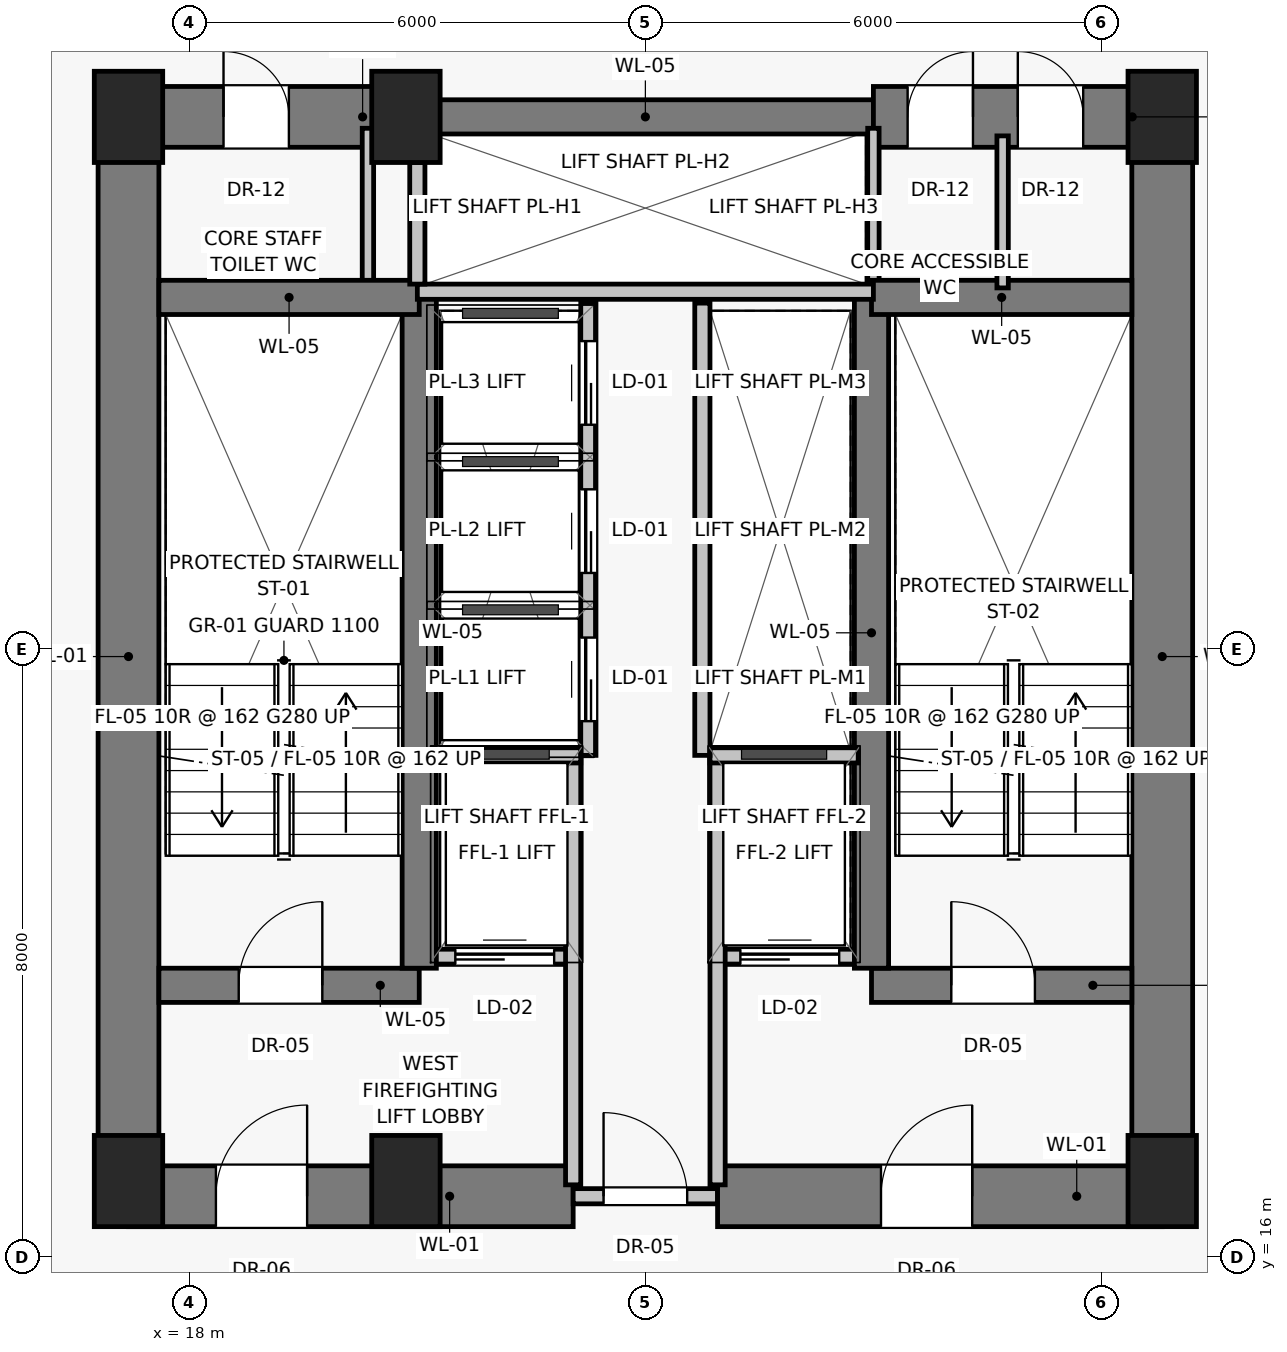
"""IFC4 building model, lengths in metres.
Left out: names, types, materials, properties, quantities, classifications, styles, units other than length and angle.
Written with IfcOpenShell. Run it as: python <this file> out.ifc"""

import sys

from ifc_helpers import new_model, si_unit, direction, frame, frame_2d, origin, origin_2d, place, context, subcontext, project, spatial, rectangle, extrude, source, transform, mapped, element, fill, save


model = new_model("IFC4")
c1 = context("Model", 3, precision=1e-05, world=origin(), true_north=direction((0.0, 1.0)))
c2 = subcontext(c1, "Body", "Model", "MODEL_VIEW")
j1 = project(units=[si_unit("LENGTHUNIT", "METRE"), si_unit("PLANEANGLEUNIT", "RADIAN")], contexts=[c1])
p1 = place(None, origin())
s1 = spatial("IfcSite", under=j1, at=p1, CompositionType="ELEMENT")
p2 = place(p1, origin())
s2 = spatial("IfcBuilding", under=s1, at=p2, CompositionType="ELEMENT")
p3 = place(p2, frame((0.0, 0.0, 67.35)))
s3 = spatial("IfcBuildingStorey", under=s2, at=p3, CompositionType="ELEMENT", Elevation=67.35)
for number, where, z_axis, x_axis in (
    (1, (17.2, 17.0, 0.0), (0.0, 0.0, 1.0), (1.0, 0.0, 0.0)),
    (2, (20.85, 17.0, 0.0), (0.0, 0.0, 1.0), (1.0, 0.0, 0.0)),
    (3, (30.8, 17.0, 0.0), (0.0, 0.0, 1.0), (1.0, 0.0, 0.0)),
    (4, (17.2, 31.0, 0.0), (0.0, 0.0, 1.0), (1.0, 0.0, 0.0)),
    (5, (20.85, 31.0, 0.0), (0.0, 0.0, 1.0), (1.0, 0.0, 0.0)),
    (6, (30.8, 31.0, 0.0), (0.0, 0.0, 1.0), (1.0, 0.0, 0.0)),
):
    element("IfcColumn", number, at=place(p3, frame(where, z_axis=z_axis, x_axis=x_axis)), inside=s3, PredefinedType="PILASTER", context=c2, shape_type="SweptSolid", body=[
        extrude(rectangle(XDim=0.9, YDim=1.2, at=origin_2d()), origin(), (0.0, 0.0, 1.0), 3.25),
    ])
for number, where, z_axis, x_axis in (
    (7, (17.2, 16.8, 0.0), (0.0, 0.0, 1.0), (0.0, 1.0, 0.0)),
    (8, (30.8, 16.8, 0.0), (0.0, 0.0, 1.0), (0.0, 1.0, 0.0)),
):
    element("IfcWall", number, at=place(p3, frame(where, z_axis=z_axis, x_axis=x_axis)), inside=s3, PredefinedType="SHEAR", context=c2, shape_type="SweptSolid", body=[
        extrude(rectangle(XDim=14.2, YDim=0.8, at=frame_2d((7.1, 0.0))), origin(), (0.0, 0.0, 1.0), 3.0),
    ])
p4 = place(p3, frame((17.2, 16.8, 0.0), z_axis=(0.0, 0.0, 1.0), x_axis=(1.0, 0.0, 0.0)))
e9 = element("IfcWall", 9, at=p4, inside=s3, PredefinedType="SHEAR", context=c2, shape_type="SweptSolid", body=[
    extrude(rectangle(XDim=5.85, YDim=0.8, at=frame_2d((2.925, 0.0))), origin(), (0.0, 0.0, 1.0), 3.0),
])
p5 = place(p4, frame((1.15, 0.0, 0.0)))
e10 = element("IfcOpeningElement", 10, at=p5, cuts=e9, PredefinedType="OPENING", context=c2, shape_type="SweptSolid", body=[
    extrude(rectangle(XDim=1.2, YDim=2.03, at=frame_2d((0.6, 1.015))), frame((0.0, 0.41, 0.0), z_axis=(0.0, -1.0, 0.0), x_axis=(1.0, 0.0, 0.0)), (0.0, 0.0, 1.0), 0.82),
])
p6 = place(p3, frame((23.05, 16.8, 0.0), z_axis=(0.0, 0.0, 1.0), x_axis=(1.0, 0.0, 0.0)))
e11 = element("IfcWall", 11, at=p6, inside=s3, PredefinedType="SOLIDWALL", context=c2, shape_type="SweptSolid", body=[
    extrude(rectangle(XDim=1.9, YDim=0.2, at=frame_2d((0.95, 0.0))), origin(), (0.0, 0.0, 1.0), 2.15),
])
p7 = place(p6, frame((0.4, 0.0, 0.0)))
e12 = element("IfcOpeningElement", 12, at=p7, cuts=e11, PredefinedType="OPENING", context=c2, shape_type="SweptSolid", body=[
    extrude(rectangle(XDim=1.1, YDim=2.03, at=frame_2d((0.55, 1.015))), frame((0.0, 0.11, 0.0), z_axis=(0.0, -1.0, 0.0), x_axis=(1.0, 0.0, 0.0)), (0.0, 0.0, 1.0), 0.22),
])
p8 = place(p3, frame((24.95, 16.8, 0.0), z_axis=(0.0, 0.0, 1.0), x_axis=(1.0, 0.0, 0.0)))
e13 = element("IfcWall", 13, at=p8, inside=s3, PredefinedType="SHEAR", context=c2, shape_type="SweptSolid", body=[
    extrude(rectangle(XDim=5.85, YDim=0.8, at=frame_2d((2.925, 0.0))), origin(), (0.0, 0.0, 1.0), 3.0),
])
p9 = place(p8, frame((2.15, 0.0, 0.0)))
e14 = element("IfcOpeningElement", 14, at=p9, cuts=e13, PredefinedType="OPENING", context=c2, shape_type="SweptSolid", body=[
    extrude(rectangle(XDim=1.2, YDim=2.03, at=frame_2d((0.6, 1.015))), frame((0.0, 0.41, 0.0), z_axis=(0.0, -1.0, 0.0), x_axis=(1.0, 0.0, 0.0)), (0.0, 0.0, 1.0), 0.82),
])
p10 = place(p3, frame((17.2, 31.0, 0.0), z_axis=(0.0, 0.0, 1.0), x_axis=(1.0, 0.0, 0.0)))
e15 = element("IfcWall", 15, at=p10, inside=s3, PredefinedType="SHEAR", context=c2, shape_type="SweptSolid", body=[
    extrude(rectangle(XDim=3.8, YDim=0.8, at=frame_2d((1.9, 0.0))), origin(), (0.0, 0.0, 1.0), 3.0),
])
p11 = place(p10, frame((1.25, 0.0, 0.0)))
e16 = element("IfcOpeningElement", 16, at=p11, cuts=e15, PredefinedType="OPENING", context=c2, shape_type="SweptSolid", body=[
    extrude(rectangle(XDim=0.86, YDim=2.01, at=frame_2d((0.43, 1.005))), frame((0.0, 0.41, 0.0), z_axis=(0.0, -1.0, 0.0), x_axis=(1.0, 0.0, 0.0)), (0.0, 0.0, 1.0), 0.82),
])
p12 = place(p3, frame((21.0, 31.0, 0.0), z_axis=(0.0, 0.0, 1.0), x_axis=(1.0, 0.0, 0.0)))
e17 = element("IfcWall", 17, at=p12, inside=s3, PredefinedType="SHEAR", context=c2, shape_type="SweptSolid", body=[
    extrude(rectangle(XDim=6.0, YDim=0.45, at=frame_2d((3.0, 0.0))), origin(), (0.0, 0.0, 1.0), 3.0),
])
p13 = place(p3, frame((27.0, 31.0, 0.0), z_axis=(0.0, 0.0, 1.0), x_axis=(1.0, 0.0, 0.0)))
e18 = element("IfcWall", 18, at=p13, inside=s3, PredefinedType="SHEAR", context=c2, shape_type="SweptSolid", body=[
    extrude(rectangle(XDim=3.8, YDim=0.8, at=frame_2d((1.9, 0.0))), origin(), (0.0, 0.0, 1.0), 3.0),
])
p14 = place(p13, frame((0.45, 0.0, 0.0)))
e19 = element("IfcOpeningElement", 19, at=p14, cuts=e18, PredefinedType="OPENING", context=c2, shape_type="SweptSolid", body=[
    extrude(rectangle(XDim=0.86, YDim=2.01, at=frame_2d((0.43, 1.005))), frame((0.0, 0.41, 0.0), z_axis=(0.0, -1.0, 0.0), x_axis=(1.0, 0.0, 0.0)), (0.0, 0.0, 1.0), 0.82),
])
p15 = place(p13, frame((1.9, 0.0, 0.0)))
e20 = element("IfcOpeningElement", 20, at=p15, cuts=e18, PredefinedType="OPENING", context=c2, shape_type="SweptSolid", body=[
    extrude(rectangle(XDim=0.86, YDim=2.01, at=frame_2d((0.43, 1.005))), frame((0.0, 0.41, 0.0), z_axis=(0.0, -1.0, 0.0), x_axis=(1.0, 0.0, 0.0)), (0.0, 0.0, 1.0), 0.82),
])
for number, where, z_axis, x_axis in (
    (21, (20.35, 28.65, 0.0), (0.0, 0.0, 1.0), (0.0, 1.0, 0.0)),
    (22, (27.0, 28.65, 0.0), (0.0, 0.0, 1.0), (0.0, 1.0, 0.0)),
):
    element("IfcWall", number, at=place(p3, frame(where, z_axis=z_axis, x_axis=x_axis)), inside=s3, PredefinedType="PARTITIONING", context=c2, shape_type="SweptSolid", body=[
        extrude(rectangle(XDim=2.2, YDim=0.15, at=frame_2d((1.1, 0.0))), origin(), (0.0, 0.0, 1.0), 3.0),
    ])
p16 = place(p3, frame((17.6, 19.575, 0.0), z_axis=(0.0, 0.0, 1.0), x_axis=(1.0, 0.0, 0.0)))
e23 = element("IfcWall", 23, at=p16, inside=s3, PredefinedType="SHEAR", context=c2, shape_type="SweptSolid", body=[
    extrude(rectangle(XDim=3.425, YDim=0.45, at=frame_2d((1.712, 0.0))), origin(), (0.0, 0.0, 1.0), 3.0),
])
p17 = place(p16, frame((1.05, 0.0, 0.0)))
e24 = element("IfcOpeningElement", 24, at=p17, cuts=e23, PredefinedType="OPENING", context=c2, shape_type="SweptSolid", body=[
    extrude(rectangle(XDim=1.1, YDim=2.03, at=frame_2d((0.55, 1.015))), frame((0.0, 0.235, 0.0), z_axis=(0.0, -1.0, 0.0), x_axis=(1.0, 0.0, 0.0)), (0.0, 0.0, 1.0), 0.47),
])
p18 = place(p3, frame((21.2, 19.95, 0.0), z_axis=(0.0, 0.0, 1.0), x_axis=(1.0, 0.0, 0.0)))
e25 = element("IfcWall", 25, at=p18, inside=s3, PredefinedType="SOLIDWALL", context=c2, shape_type="SweptSolid", body=[
    extrude(rectangle(XDim=1.85, YDim=0.2, at=frame_2d((0.925, 0.0))), origin(), (0.0, 0.0, 1.0), 3.0),
])
p19 = place(p18, frame((0.3, 0.0, 0.0)))
e26 = element("IfcOpeningElement", 26, at=p19, cuts=e25, PredefinedType="OPENING", context=c2, shape_type="SweptSolid", body=[
    extrude(rectangle(XDim=1.3, YDim=2.25, at=frame_2d((0.65, 1.125))), frame((0.0, 0.11, 0.0), z_axis=(0.0, -1.0, 0.0), x_axis=(1.0, 0.0, 0.0)), (0.0, 0.0, 1.0), 0.22),
])
p20 = place(p3, frame((24.95, 19.95, 0.0), z_axis=(0.0, 0.0, 1.0), x_axis=(1.0, 0.0, 0.0)))
e27 = element("IfcWall", 27, at=p20, inside=s3, PredefinedType="SOLIDWALL", context=c2, shape_type="SweptSolid", body=[
    extrude(rectangle(XDim=1.85, YDim=0.2, at=frame_2d((0.925, 0.0))), origin(), (0.0, 0.0, 1.0), 3.0),
])
p21 = place(p20, frame((0.3, 0.0, 0.0)))
e28 = element("IfcOpeningElement", 28, at=p21, cuts=e27, PredefinedType="OPENING", context=c2, shape_type="SweptSolid", body=[
    extrude(rectangle(XDim=1.3, YDim=2.25, at=frame_2d((0.65, 1.125))), frame((0.0, 0.11, 0.0), z_axis=(0.0, -1.0, 0.0), x_axis=(1.0, 0.0, 0.0)), (0.0, 0.0, 1.0), 0.22),
])
p22 = place(p3, frame((26.975, 19.575, 0.0), z_axis=(0.0, 0.0, 1.0), x_axis=(1.0, 0.0, 0.0)))
e29 = element("IfcWall", 29, at=p22, inside=s3, PredefinedType="SHEAR", context=c2, shape_type="SweptSolid", body=[
    extrude(rectangle(XDim=3.425, YDim=0.45, at=frame_2d((1.712, 0.0))), origin(), (0.0, 0.0, 1.0), 3.0),
])
p23 = place(p22, frame((1.05, 0.0, 0.0)))
e30 = element("IfcOpeningElement", 30, at=p23, cuts=e29, PredefinedType="OPENING", context=c2, shape_type="SweptSolid", body=[
    extrude(rectangle(XDim=1.1, YDim=2.03, at=frame_2d((0.55, 1.015))), frame((0.0, 0.235, 0.0), z_axis=(0.0, -1.0, 0.0), x_axis=(1.0, 0.0, 0.0)), (0.0, 0.0, 1.0), 0.47),
])
for number, where, z_axis, x_axis in (
    (31, (21.025, 19.8, 0.0), (0.0, 0.0, 1.0), (0.0, 1.0, 0.0)),
    (32, (26.975, 19.8, 0.0), (0.0, 0.0, 1.0), (0.0, 1.0, 0.0)),
):
    element("IfcWall", number, at=place(p3, frame(where, z_axis=z_axis, x_axis=x_axis)), inside=s3, PredefinedType="SHEAR", context=c2, shape_type="SweptSolid", body=[
        extrude(rectangle(XDim=8.825, YDim=0.45, at=frame_2d((4.413, 0.0))), origin(), (0.0, 0.0, 1.0), 3.0),
    ])
for number, where, z_axis, x_axis in (
    (33, (17.6, 28.625, 0.0), (0.0, 0.0, 1.0), (1.0, 0.0, 0.0)),
    (34, (26.975, 28.625, 0.0), (0.0, 0.0, 1.0), (1.0, 0.0, 0.0)),
):
    element("IfcWall", number, at=place(p3, frame(where, z_axis=z_axis, x_axis=x_axis)), inside=s3, PredefinedType="SHEAR", context=c2, shape_type="SweptSolid", body=[
        extrude(rectangle(XDim=3.425, YDim=0.45, at=frame_2d((1.712, 0.0))), origin(), (0.0, 0.0, 1.0), 3.0),
    ])
for number, where, z_axis, x_axis in (
    (35, (23.05, 16.95, 0.0), (0.0, 0.0, 1.0), (0.0, 1.0, 0.0)),
    (36, (24.95, 16.95, 0.0), (0.0, 0.0, 1.0), (0.0, 1.0, 0.0)),
):
    element("IfcWall", number, at=place(p3, frame(where, z_axis=z_axis, x_axis=x_axis)), inside=s3, PredefinedType="SOLIDWALL", context=c2, shape_type="SweptSolid", body=[
        extrude(rectangle(XDim=5.6, YDim=0.2, at=frame_2d((2.8, 0.0))), origin(), (0.0, 0.0, 1.0), 3.0),
    ])
for number, where, z_axis, x_axis in (
    (37, (21.2, 22.6, 0.0), (0.0, 0.0, 1.0), (1.0, 0.0, 0.0)),
    (38, (24.85, 22.6, 0.0), (0.0, 0.0, 1.0), (1.0, 0.0, 0.0)),
):
    element("IfcWall", number, at=place(p3, frame(where, z_axis=z_axis, x_axis=x_axis)), inside=s3, PredefinedType="SOLIDWALL", context=c2, shape_type="SweptSolid", body=[
        extrude(rectangle(XDim=1.95, YDim=0.2, at=frame_2d((0.975, 0.0))), origin(), (0.0, 0.0, 1.0), 3.0),
    ])
p24 = place(p3, frame((21.0, 28.7, 0.0), z_axis=(0.0, 0.0, 1.0), x_axis=(1.0, 0.0, 0.0)))
e39 = element("IfcWall", 39, at=p24, inside=s3, PredefinedType="SOLIDWALL", context=c2, shape_type="SweptSolid", body=[
    extrude(rectangle(XDim=6.0, YDim=0.2, at=frame_2d((3.0, 0.0))), origin(), (0.0, 0.0, 1.0), 3.0),
])
p25 = place(p3, frame((21.0, 28.8, 0.0), z_axis=(0.0, 0.0, 1.0), x_axis=(0.0, 1.0, 0.0)))
e40 = element("IfcWall", 40, at=p25, inside=s3, PredefinedType="SOLIDWALL", context=c2, shape_type="SweptSolid", body=[
    extrude(rectangle(XDim=1.6, YDim=0.2, at=frame_2d((0.8, 0.0))), origin(), (0.0, 0.0, 1.0), 3.0),
])
p26 = place(p3, frame((23.25, 22.6, 0.0), z_axis=(0.0, 0.0, 1.0), x_axis=(0.0, 1.0, 0.0)))
e41 = element("IfcWall", 41, at=p26, inside=s3, PredefinedType="SOLIDWALL", context=c2, shape_type="SweptSolid", body=[
    extrude(rectangle(XDim=5.95, YDim=0.2, at=frame_2d((2.975, 0.0))), origin(), (0.0, 0.0, 1.0), 3.0),
])
p27 = place(p26, frame((0.45, 0.0, 0.0)))
e42 = element("IfcOpeningElement", 42, at=p27, cuts=e41, PredefinedType="OPENING", context=c2, shape_type="SweptSolid", body=[
    extrude(rectangle(XDim=1.1, YDim=2.08, at=frame_2d((0.55, 1.04))), frame((0.0, 0.11, 0.0), z_axis=(0.0, -1.0, 0.0), x_axis=(1.0, 0.0, 0.0)), (0.0, 0.0, 1.0), 0.22),
])
p28 = place(p26, frame((2.4, 0.0, 0.0)))
e43 = element("IfcOpeningElement", 43, at=p28, cuts=e41, PredefinedType="OPENING", context=c2, shape_type="SweptSolid", body=[
    extrude(rectangle(XDim=1.1, YDim=2.08, at=frame_2d((0.55, 1.04))), frame((0.0, 0.11, 0.0), z_axis=(0.0, -1.0, 0.0), x_axis=(1.0, 0.0, 0.0)), (0.0, 0.0, 1.0), 0.22),
])
p29 = place(p26, frame((4.35, 0.0, 0.0)))
e44 = element("IfcOpeningElement", 44, at=p29, cuts=e41, PredefinedType="OPENING", context=c2, shape_type="SweptSolid", body=[
    extrude(rectangle(XDim=1.1, YDim=2.08, at=frame_2d((0.55, 1.04))), frame((0.0, 0.11, 0.0), z_axis=(0.0, -1.0, 0.0), x_axis=(1.0, 0.0, 0.0)), (0.0, 0.0, 1.0), 0.22),
])
p30 = place(p3, frame((24.75, 22.6, 0.0), z_axis=(0.0, 0.0, 1.0), x_axis=(0.0, 1.0, 0.0)))
e45 = element("IfcWall", 45, at=p30, inside=s3, PredefinedType="SOLIDWALL", context=c2, shape_type="SweptSolid", body=[
    extrude(rectangle(XDim=5.95, YDim=0.2, at=frame_2d((2.975, 0.0))), origin(), (0.0, 0.0, 1.0), 3.0),
])
p31 = place(p3, frame((28.7, 28.75, 0.0), z_axis=(0.0, 0.0, 1.0), x_axis=(0.0, 1.0, 0.0)))
e46 = element("IfcWall", 46, at=p31, inside=s3, PredefinedType="PARTITIONING", context=c2, shape_type="SweptSolid", body=[
    extrude(rectangle(XDim=2.0, YDim=0.15, at=frame_2d((1.0, 0.0))), origin(), (0.0, 0.0, 1.0), 3.0),
])
m1 = source(origin(), c2, "Body", "SweptSolid", [
    extrude(rectangle(XDim=1.2, YDim=2.03, at=frame_2d((0.6, 1.015))), frame((0.0, 0.025, 0.0), z_axis=(0.0, -1.0, 0.0), x_axis=(1.0, 0.0, 0.0)), (0.0, 0.0, 1.0), 0.05),
])
p32 = place(p5, origin())
e47 = element("IfcDoor", 47, at=p32, inside=s3, OperationType="SINGLE_SWING_RIGHT", PredefinedType="DOOR", context=c2, shape_type="MappedRepresentation", body=[
    mapped(m1, transform((0.0, 0.0, 0.0), scale=1.0)),
])
fill(e10, e47)
m2 = source(origin(), c2, "Body", "SweptSolid", [
    extrude(rectangle(XDim=1.1, YDim=2.03, at=frame_2d((0.55, 1.015))), frame((0.0, 0.025, 0.0), z_axis=(0.0, -1.0, 0.0), x_axis=(1.0, 0.0, 0.0)), (0.0, 0.0, 1.0), 0.05),
])
p33 = place(p7, origin())
e48 = element("IfcDoor", 48, at=p33, inside=s3, OperationType="SINGLE_SWING_LEFT", PredefinedType="DOOR", context=c2, shape_type="MappedRepresentation", body=[
    mapped(m2, transform((0.0, 0.0, 0.0), scale=1.0)),
])
fill(e12, e48)
p34 = place(p9, origin())
e49 = element("IfcDoor", 49, at=p34, inside=s3, OperationType="SINGLE_SWING_RIGHT", PredefinedType="DOOR", context=c2, shape_type="MappedRepresentation", body=[
    mapped(m1, transform((0.0, 0.0, 0.0), scale=1.0)),
])
fill(e14, e49)
m3 = source(origin(), c2, "Body", "SweptSolid", [
    extrude(rectangle(XDim=0.86, YDim=2.01, at=frame_2d((0.43, 1.005))), frame((0.0, 0.025, 0.0), z_axis=(0.0, -1.0, 0.0), x_axis=(1.0, 0.0, 0.0)), (0.0, 0.0, 1.0), 0.05),
])
p35 = place(p11, origin())
e50 = element("IfcDoor", 50, at=p35, inside=s3, OperationType="SINGLE_SWING_LEFT", PredefinedType="DOOR", context=c2, shape_type="MappedRepresentation", body=[
    mapped(m3, transform((0.0, 0.0, 0.0), scale=1.0)),
])
fill(e16, e50)
p36 = place(p14, origin())
e51 = element("IfcDoor", 51, at=p36, inside=s3, OperationType="SINGLE_SWING_RIGHT", PredefinedType="DOOR", context=c2, shape_type="MappedRepresentation", body=[
    mapped(m3, transform((0.0, 0.0, 0.0), scale=1.0)),
])
fill(e19, e51)
p37 = place(p15, origin())
e52 = element("IfcDoor", 52, at=p37, inside=s3, OperationType="SINGLE_SWING_LEFT", PredefinedType="DOOR", context=c2, shape_type="MappedRepresentation", body=[
    mapped(m3, transform((0.0, 0.0, 0.0), scale=1.0)),
])
fill(e20, e52)
p38 = place(p17, origin())
e53 = element("IfcDoor", 53, at=p38, inside=s3, OperationType="SINGLE_SWING_RIGHT", PredefinedType="DOOR", context=c2, shape_type="MappedRepresentation", body=[
    mapped(m2, transform((0.0, 0.0, 0.0), scale=1.0)),
])
fill(e24, e53)
m4 = source(origin(), c2, "Body", "SweptSolid", [
    extrude(rectangle(XDim=1.3, YDim=2.25, at=frame_2d((0.65, 1.125))), frame((0.0, 0.025, 0.0), z_axis=(0.0, -1.0, 0.0), x_axis=(1.0, 0.0, 0.0)), (0.0, 0.0, 1.0), 0.05),
])
p39 = place(p19, origin())
e54 = element("IfcDoor", 54, at=p39, inside=s3, OperationType="SLIDING_TO_LEFT", PredefinedType="DOOR", context=c2, shape_type="MappedRepresentation", body=[
    mapped(m4, transform((0.0, 0.0, 0.0), scale=1.0)),
])
fill(e26, e54)
p40 = place(p21, origin())
e55 = element("IfcDoor", 55, at=p40, inside=s3, OperationType="SLIDING_TO_LEFT", PredefinedType="DOOR", context=c2, shape_type="MappedRepresentation", body=[
    mapped(m4, transform((0.0, 0.0, 0.0), scale=1.0)),
])
fill(e28, e55)
p41 = place(p23, origin())
e56 = element("IfcDoor", 56, at=p41, inside=s3, OperationType="SINGLE_SWING_LEFT", PredefinedType="DOOR", context=c2, shape_type="MappedRepresentation", body=[
    mapped(m2, transform((0.0, 0.0, 0.0), scale=1.0)),
])
fill(e30, e56)
m5 = source(origin(), c2, "Body", "SweptSolid", [
    extrude(rectangle(XDim=1.1, YDim=2.08, at=frame_2d((0.55, 1.04))), frame((0.0, 0.025, 0.0), z_axis=(0.0, -1.0, 0.0), x_axis=(1.0, 0.0, 0.0)), (0.0, 0.0, 1.0), 0.05),
])
p42 = place(p27, origin())
e57 = element("IfcDoor", 57, at=p42, inside=s3, OperationType="SLIDING_TO_LEFT", PredefinedType="DOOR", context=c2, shape_type="MappedRepresentation", body=[
    mapped(m5, transform((0.0, 0.0, 0.0), scale=1.0)),
])
fill(e42, e57)
p43 = place(p28, origin())
e58 = element("IfcDoor", 58, at=p43, inside=s3, OperationType="SLIDING_TO_LEFT", PredefinedType="DOOR", context=c2, shape_type="MappedRepresentation", body=[
    mapped(m5, transform((0.0, 0.0, 0.0), scale=1.0)),
])
fill(e43, e58)
p44 = place(p29, origin())
e59 = element("IfcDoor", 59, at=p44, inside=s3, OperationType="SLIDING_TO_LEFT", PredefinedType="DOOR", context=c2, shape_type="MappedRepresentation", body=[
    mapped(m5, transform((0.0, 0.0, 0.0), scale=1.0)),
])
fill(e44, e59)
save(model, sys.argv[1])
